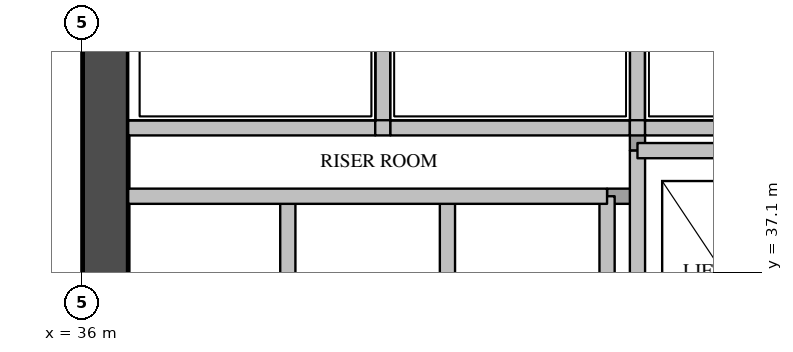
"""IFC4 building model, lengths in metres.
Left out: names, types, materials, properties, quantities, classifications, styles, units other than length and angle.
Written with IfcOpenShell. Run it as: python <this file> out.ifc"""

import sys

from ifc_helpers import new_model, si_unit, direction, frame, frame_2d, origin, place, context, subcontext, project, spatial, rectangle, extrude, element, save


model = new_model("IFC4")
c1 = context("Model", 3, precision=1e-05, world=origin(), true_north=direction((0.0, 1.0)))
c2 = subcontext(c1, "Body", "Model", "MODEL_VIEW")
j1 = project(units=[si_unit("LENGTHUNIT", "METRE"), si_unit("PLANEANGLEUNIT", "RADIAN")], contexts=[c1])
p1 = place(None, origin())
s1 = spatial("IfcSite", under=j1, at=p1, CompositionType="ELEMENT")
p2 = place(p1, origin())
s2 = spatial("IfcBuilding", under=s1, at=p2, CompositionType="ELEMENT")
p3 = place(p2, frame((0.0, 0.0, -6.0)))
s3 = spatial("IfcBuildingStorey", under=s2, at=p3, CompositionType="ELEMENT", Elevation=-6.0)
p4 = place(p3, frame((36.3, 29.1, 0.0), z_axis=(0.0, 0.0, 1.0), x_axis=(0.0, 1.0, 0.0)))
e1 = element("IfcWall", 1, at=p4, inside=s3, PredefinedType="SHEAR", context=c2, shape_type="SweptSolid", body=[
    extrude(rectangle(XDim=20.3, YDim=0.6, at=frame_2d((10.15, 0.0))), origin(), (0.0, 0.0, 1.0), 5.59),
])
p5 = place(p4, frame((16.4, 0.0, 0.0)))
e2 = element("IfcOpeningElement", 2, at=p5, cuts=e1, PredefinedType="OPENING", context=c2, shape_type="SweptSolid", body=[
    extrude(rectangle(XDim=1.0, YDim=2.1, at=frame_2d((0.5, 1.05))), frame((0.0, 0.31, 0.0), z_axis=(0.0, -1.0, 0.0), x_axis=(1.0, 0.0, 0.0)), (0.0, 0.0, 1.0), 0.62),
])
p6 = place(p3, frame((38.7, 34.9, 0.0), z_axis=(0.0, 0.0, 1.0), x_axis=(0.0, 1.0, 0.0)))
e3 = element("IfcWall", 3, at=p6, inside=s3, PredefinedType="SOLIDWALL", context=c2, shape_type="SweptSolid", body=[
    extrude(rectangle(XDim=3.2, YDim=0.2, at=frame_2d((1.6, 0.0))), origin(), (0.0, 0.0, 1.0), 5.59),
])
p7 = place(p3, frame((39.95, 39.0, 0.0), z_axis=(0.0, 0.0, 1.0), x_axis=(0.0, 1.0, 0.0)))
e4 = element("IfcWall", 4, at=p7, inside=s3, PredefinedType="SOLIDWALL", context=c2, shape_type="SweptSolid", body=[
    extrude(rectangle(XDim=2.02, YDim=0.2, at=frame_2d((1.01, 0.0))), origin(), (0.0, 0.0, 1.0), 5.59),
])
for number, where, z_axis, x_axis in (
    (5, (40.8, 34.9, 0.0), (0.0, 0.0, 1.0), (0.0, 1.0, 0.0)),
    (6, (42.9, 34.9, 0.0), (0.0, 0.0, 1.0), (0.0, 1.0, 0.0)),
):
    element("IfcWall", number, at=place(p3, frame(where, z_axis=z_axis, x_axis=x_axis)), inside=s3, PredefinedType="SOLIDWALL", context=c2, shape_type="SweptSolid", body=[
        extrude(rectangle(XDim=3.2, YDim=0.2, at=frame_2d((1.6, 0.0))), origin(), (0.0, 0.0, 1.0), 5.59),
    ])
p8 = place(p3, frame((43.3, 35.5, 0.0), z_axis=(0.0, 0.0, 1.0), x_axis=(0.0, 1.0, 0.0)))
e7 = element("IfcWall", 7, at=p8, inside=s3, PredefinedType="SOLIDWALL", context=c2, shape_type="SweptSolid", body=[
    extrude(rectangle(XDim=3.2, YDim=0.2, at=frame_2d((1.6, 0.0))), origin(), (0.0, 0.0, 1.0), 5.59),
])
p9 = place(p3, frame((43.3, 38.7, 0.0), z_axis=(0.0, 0.0, 1.0), x_axis=(0.0, 1.0, 0.0)))
e8 = element("IfcWall", 8, at=p9, inside=s3, PredefinedType="SOLIDWALL", context=c2, shape_type="SweptSolid", body=[
    extrude(rectangle(XDim=0.3, YDim=0.2, at=frame_2d((0.15, 0.0))), origin(), (0.0, 0.0, 1.0), 5.59),
])
p10 = place(p3, frame((43.3, 39.0, 0.0), z_axis=(0.0, 0.0, 1.0), x_axis=(0.0, 1.0, 0.0)))
e9 = element("IfcWall", 9, at=p10, inside=s3, PredefinedType="SOLIDWALL", context=c2, shape_type="SweptSolid", body=[
    extrude(rectangle(XDim=2.02, YDim=0.2, at=frame_2d((1.01, 0.0))), origin(), (0.0, 0.0, 1.0), 5.59),
])
p11 = place(p3, frame((36.6, 38.1, 0.0), z_axis=(0.0, 0.0, 1.0), x_axis=(1.0, 0.0, 0.0)))
e10 = element("IfcWall", 10, at=p11, inside=s3, PredefinedType="SOLIDWALL", context=c2, shape_type="SweptSolid", body=[
    extrude(rectangle(XDim=6.3, YDim=0.2, at=frame_2d((3.15, 0.0))), origin(), (0.0, 0.0, 1.0), 5.59),
])
p12 = place(p3, frame((42.9, 38.1, 0.0), z_axis=(0.0, 0.0, 1.0), x_axis=(1.0, 0.0, 0.0)))
e11 = element("IfcWall", 11, at=p12, inside=s3, PredefinedType="SOLIDWALL", context=c2, shape_type="SweptSolid", body=[
    extrude(rectangle(XDim=0.4, YDim=0.2, at=frame_2d((0.2, 0.0))), origin(), (0.0, 0.0, 1.0), 5.59),
])
p13 = place(p3, frame((43.3, 38.7, 0.0), z_axis=(0.0, 0.0, 1.0), x_axis=(1.0, 0.0, 0.0)))
e12 = element("IfcWall", 12, at=p13, inside=s3, PredefinedType="SOLIDWALL", context=c2, shape_type="SweptSolid", body=[
    extrude(rectangle(XDim=2.25, YDim=0.2, at=frame_2d((1.125, 0.0))), origin(), (0.0, 0.0, 1.0), 5.59),
])
p14 = place(p3, frame((36.6, 39.0, 0.0), z_axis=(0.0, 0.0, 1.0), x_axis=(1.0, 0.0, 0.0)))
e13 = element("IfcWall", 13, at=p14, inside=s3, PredefinedType="SOLIDWALL", context=c2, shape_type="SweptSolid", body=[
    extrude(rectangle(XDim=3.25, YDim=0.2, at=frame_2d((1.625, 0.0))), origin(), (0.0, 0.0, 1.0), 5.59),
])
p15 = place(p3, frame((39.85, 39.0, 0.0), z_axis=(0.0, 0.0, 1.0), x_axis=(1.0, 0.0, 0.0)))
e14 = element("IfcWall", 14, at=p15, inside=s3, PredefinedType="SOLIDWALL", context=c2, shape_type="SweptSolid", body=[
    extrude(rectangle(XDim=0.2, YDim=0.2, at=frame_2d((0.1, 0.0))), origin(), (0.0, 0.0, 1.0), 5.59),
])
p16 = place(p3, frame((40.05, 39.0, 0.0), z_axis=(0.0, 0.0, 1.0), x_axis=(1.0, 0.0, 0.0)))
e15 = element("IfcWall", 15, at=p16, inside=s3, PredefinedType="SOLIDWALL", context=c2, shape_type="SweptSolid", body=[
    extrude(rectangle(XDim=3.15, YDim=0.2, at=frame_2d((1.575, 0.0))), origin(), (0.0, 0.0, 1.0), 5.59),
])
p17 = place(p3, frame((43.2, 39.0, 0.0), z_axis=(0.0, 0.0, 1.0), x_axis=(1.0, 0.0, 0.0)))
e16 = element("IfcWall", 16, at=p17, inside=s3, PredefinedType="SOLIDWALL", context=c2, shape_type="SweptSolid", body=[
    extrude(rectangle(XDim=0.2, YDim=0.2, at=frame_2d((0.1, 0.0))), origin(), (0.0, 0.0, 1.0), 5.59),
])
p18 = place(p3, frame((43.4, 39.0, 0.0), z_axis=(0.0, 0.0, 1.0), x_axis=(1.0, 0.0, 0.0)))
e17 = element("IfcWall", 17, at=p18, inside=s3, PredefinedType="SOLIDWALL", context=c2, shape_type="SweptSolid", body=[
    extrude(rectangle(XDim=3.25, YDim=0.2, at=frame_2d((1.625, 0.0))), origin(), (0.0, 0.0, 1.0), 5.59),
])
save(model, sys.argv[1])
